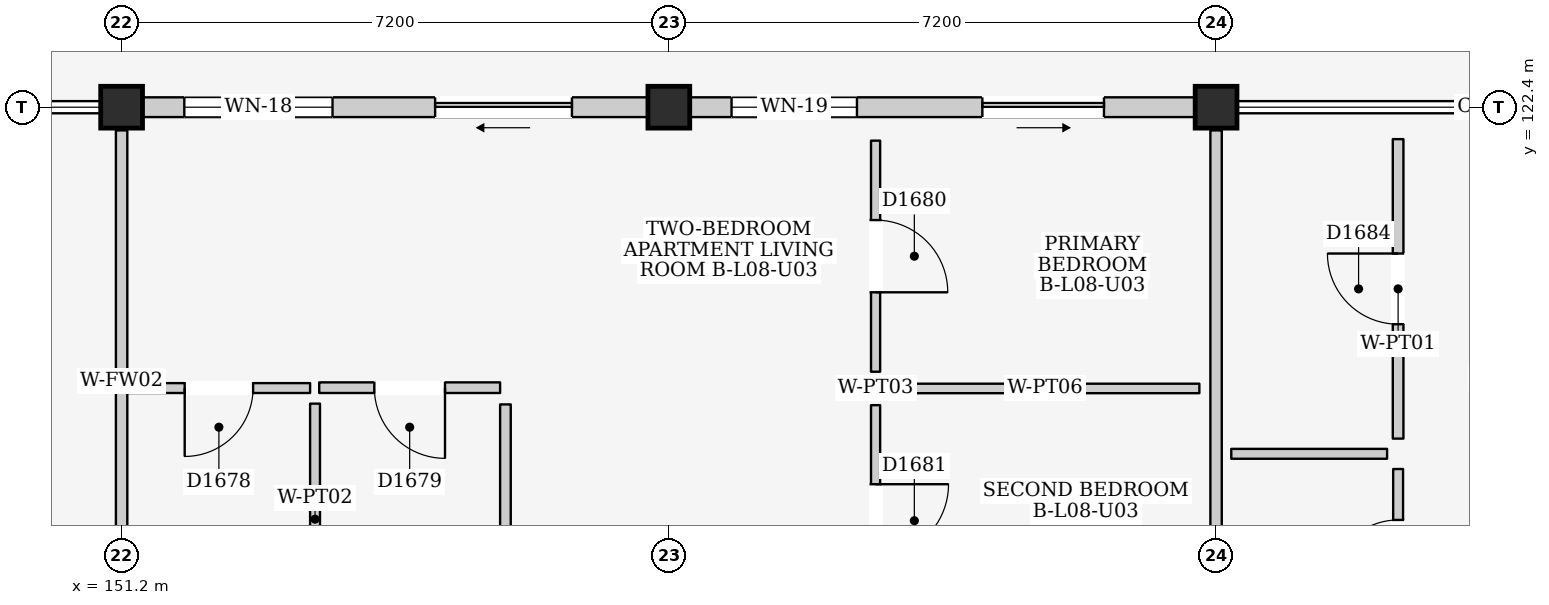
"""IFC4 building model, lengths in metres.
Left out: names, types, materials, properties, quantities, classifications, styles, units other than length and angle.
Written with IfcOpenShell. Run it as: python <this file> out.ifc"""

import sys

from ifc_helpers import new_model, si_unit, direction, frame, frame_2d, origin, origin_2d, place, context, subcontext, project, spatial, rectangle, extrude, element, fill, save


model = new_model("IFC4")
c1 = context("Model", 3, precision=1e-05, world=origin(), true_north=direction((0.0, 1.0)))
c2 = subcontext(c1, "Body", "Model", "MODEL_VIEW")
j1 = project(units=[si_unit("LENGTHUNIT", "METRE"), si_unit("PLANEANGLEUNIT", "RADIAN")], contexts=[c1])
p1 = place(None, origin())
s1 = spatial("IfcSite", under=j1, at=p1, CompositionType="ELEMENT")
p2 = place(p1, origin())
s2 = spatial("IfcBuilding", under=s1, at=p2, CompositionType="ELEMENT")
p3 = place(p2, frame((0.0, 0.0, 28.3)))
s3 = spatial("IfcBuildingStorey", under=s2, at=p3, CompositionType="ELEMENT", Elevation=28.3)
for number, where, z_axis, x_axis in (
    (1, (151.2, 122.4, 0.0), (0.0, 0.0, 1.0), (1.0, 0.0, 0.0)),
    (2, (158.4, 122.4, 0.0), (0.0, 0.0, 1.0), (1.0, 0.0, 0.0)),
    (3, (165.6, 122.4, 0.0), (0.0, 0.0, 1.0), (1.0, 0.0, 0.0)),
):
    element("IfcColumn", number, at=place(p3, frame(where, z_axis=z_axis, x_axis=x_axis)), inside=s3, PredefinedType="COLUMN", context=c2, shape_type="SweptSolid", body=[
        extrude(rectangle(XDim=0.55, YDim=0.55, at=origin_2d()), origin(), (0.0, 0.0, 1.0), 3.2),
    ])
p4 = place(p3, frame((151.475, 122.4, 0.0), z_axis=(0.0, 0.0, 1.0), x_axis=(1.0, 0.0, 0.0)))
e4 = element("IfcWall", 4, at=p4, inside=s3, PredefinedType="ELEMENTEDWALL", context=c2, shape_type="SweptSolid", body=[
    extrude(rectangle(XDim=6.65, YDim=0.26, at=frame_2d((3.325, 0.0))), origin(), (0.0, 0.0, 1.0), 2.485),
])
p5 = place(p4, frame((3.85, 0.0, 0.0)))
e5 = element("IfcOpeningElement", 5, at=p5, cuts=e4, PredefinedType="OPENING", context=c2, shape_type="SweptSolid", body=[
    extrude(rectangle(XDim=1.8, YDim=2.12, at=frame_2d((0.9, 1.06))), frame((0.0, 0.145, 0.0), z_axis=(0.0, -1.0, 0.0), x_axis=(1.0, 0.0, 0.0)), (0.0, 0.0, 1.0), 0.29),
])
p6 = place(p4, frame((0.55, 0.0, 0.825)))
e6 = element("IfcOpeningElement", 6, at=p6, cuts=e4, PredefinedType="OPENING", context=c2, shape_type="SweptSolid", body=[
    extrude(rectangle(XDim=1.95, YDim=1.55, at=frame_2d((0.975, 0.775))), frame((0.0, 0.145, 0.0), z_axis=(0.0, -1.0, 0.0), x_axis=(1.0, 0.0, 0.0)), (0.0, 0.0, 1.0), 0.29),
])
p7 = place(p3, frame((158.675, 122.4, 0.0), z_axis=(0.0, 0.0, 1.0), x_axis=(1.0, 0.0, 0.0)))
e7 = element("IfcWall", 7, at=p7, inside=s3, PredefinedType="ELEMENTEDWALL", context=c2, shape_type="SweptSolid", body=[
    extrude(rectangle(XDim=6.65, YDim=0.26, at=frame_2d((3.325, 0.0))), origin(), (0.0, 0.0, 1.0), 2.485),
])
p8 = place(p7, frame((3.85, 0.0, 0.0)))
e8 = element("IfcOpeningElement", 8, at=p8, cuts=e7, PredefinedType="OPENING", context=c2, shape_type="SweptSolid", body=[
    extrude(rectangle(XDim=1.6, YDim=2.12, at=frame_2d((0.8, 1.06))), frame((0.0, 0.145, 0.0), z_axis=(0.0, -1.0, 0.0), x_axis=(1.0, 0.0, 0.0)), (0.0, 0.0, 1.0), 0.29),
])
p9 = place(p7, frame((0.55, 0.0, 0.9)))
e9 = element("IfcOpeningElement", 9, at=p9, cuts=e7, PredefinedType="OPENING", context=c2, shape_type="SweptSolid", body=[
    extrude(rectangle(XDim=1.65, YDim=1.35, at=frame_2d((0.825, 0.675))), frame((0.0, 0.145, 0.0), z_axis=(0.0, -1.0, 0.0), x_axis=(1.0, 0.0, 0.0)), (0.0, 0.0, 1.0), 0.29),
])
for number, where, z_axis, x_axis in (
    (10, (151.2, 115.505, 0.0), (0.0, 0.0, 1.0), (0.0, 1.0, 0.0)),
    (11, (165.6, 115.505, 0.0), (0.0, 0.0, 1.0), (0.0, 1.0, 0.0)),
):
    element("IfcWall", number, at=place(p3, frame(where, z_axis=z_axis, x_axis=x_axis)), inside=s3, PredefinedType="PARTITIONING", context=c2, shape_type="SweptSolid", body=[
        extrude(rectangle(XDim=6.59, YDim=0.15, at=frame_2d((3.295, 0.0))), origin(), (0.0, 0.0, 1.0), 2.435),
    ])
p10 = place(p3, frame((151.28, 118.705, 0.0), z_axis=(0.0, 0.0, 1.0), x_axis=(1.0, 0.0, 0.0)))
e12 = element("IfcWall", 12, at=p10, inside=s3, PredefinedType="PARTITIONING", context=c2, shape_type="SweptSolid", body=[
    extrude(rectangle(XDim=2.4, YDim=0.13, at=frame_2d((1.2, 0.0))), origin(), (0.0, 0.0, 1.0), 2.95),
])
p11 = place(p10, frame((0.75, 0.0, 0.0)))
e13 = element("IfcOpeningElement", 13, at=p11, cuts=e12, PredefinedType="OPENING", context=c2, shape_type="SweptSolid", body=[
    extrude(rectangle(XDim=0.9, YDim=2.1, at=frame_2d((0.45, 1.05))), frame((0.0, 0.08, 0.0), z_axis=(0.0, -1.0, 0.0), x_axis=(1.0, 0.0, 0.0)), (0.0, 0.0, 1.0), 0.16),
])
p12 = place(p3, frame((153.745, 115.46, 0.0), z_axis=(0.0, 0.0, 1.0), x_axis=(0.0, 1.0, 0.0)))
e14 = element("IfcWall", 14, at=p12, inside=s3, PredefinedType="PARTITIONING", context=c2, shape_type="SweptSolid", body=[
    extrude(rectangle(XDim=3.04, YDim=0.13, at=frame_2d((1.52, 0.0))), origin(), (0.0, 0.0, 1.0), 2.95),
])
p13 = place(p3, frame((153.8, 118.71, 0.0), z_axis=(0.0, 0.0, 1.0), x_axis=(1.0, 0.0, 0.0)))
e15 = element("IfcWall", 15, at=p13, inside=s3, PredefinedType="PARTITIONING", context=c2, shape_type="SweptSolid", body=[
    extrude(rectangle(XDim=2.38, YDim=0.14, at=frame_2d((1.19, 0.0))), origin(), (0.0, 0.0, 1.0), 2.95),
])
p14 = place(p13, frame((0.725, 0.0, 0.0)))
e16 = element("IfcOpeningElement", 16, at=p14, cuts=e15, PredefinedType="OPENING", context=c2, shape_type="SweptSolid", body=[
    extrude(rectangle(XDim=0.93, YDim=2.14, at=frame_2d((0.465, 1.07))), frame((0.0, 0.085, 0.0), z_axis=(0.0, -1.0, 0.0), x_axis=(1.0, 0.0, 0.0)), (0.0, 0.0, 1.0), 0.17),
])
p15 = place(p3, frame((156.25, 115.43, 0.0), z_axis=(0.0, 0.0, 1.0), x_axis=(0.0, 1.0, 0.0)))
e17 = element("IfcWall", 17, at=p15, inside=s3, PredefinedType="PARTITIONING", context=c2, shape_type="SweptSolid", body=[
    extrude(rectangle(XDim=3.06, YDim=0.14, at=frame_2d((1.53, 0.0))), origin(), (0.0, 0.0, 1.0), 2.95),
])
p16 = place(p3, frame((161.12, 118.92, 0.0), z_axis=(0.0, 0.0, 1.0), x_axis=(0.0, 1.0, 0.0)))
e18 = element("IfcWall", 18, at=p16, inside=s3, PredefinedType="PARTITIONING", context=c2, shape_type="SweptSolid", body=[
    extrude(rectangle(XDim=3.04, YDim=0.12, at=frame_2d((1.52, 0.0))), origin(), (0.0, 0.0, 1.0), 2.95),
])
p17 = place(p16, frame((1.045, 0.0, 0.0)))
e19 = element("IfcOpeningElement", 19, at=p17, cuts=e18, PredefinedType="OPENING", context=c2, shape_type="SweptSolid", body=[
    extrude(rectangle(XDim=0.95, YDim=2.15, at=frame_2d((0.475, 1.075))), frame((0.0, 0.075, 0.0), z_axis=(0.0, -1.0, 0.0), x_axis=(1.0, 0.0, 0.0)), (0.0, 0.0, 1.0), 0.15),
])
p18 = place(p3, frame((161.32, 118.7, 0.0), z_axis=(0.0, 0.0, 1.0), x_axis=(1.0, 0.0, 0.0)))
e20 = element("IfcWall", 20, at=p18, inside=s3, PredefinedType="PARTITIONING", context=c2, shape_type="SweptSolid", body=[
    extrude(rectangle(XDim=4.06, YDim=0.125, at=frame_2d((2.03, 0.0))), origin(), (0.0, 0.0, 1.0), 2.95),
])
p19 = place(p3, frame((161.12, 115.44, 0.0), z_axis=(0.0, 0.0, 1.0), x_axis=(0.0, 1.0, 0.0)))
e21 = element("IfcWall", 21, at=p19, inside=s3, PredefinedType="PARTITIONING", context=c2, shape_type="SweptSolid", body=[
    extrude(rectangle(XDim=3.04, YDim=0.12, at=frame_2d((1.52, 0.0))), origin(), (0.0, 0.0, 1.0), 2.95),
])
p20 = place(p19, frame((1.04, 0.0, 0.0)))
e22 = element("IfcOpeningElement", 22, at=p20, cuts=e21, PredefinedType="OPENING", context=c2, shape_type="SweptSolid", body=[
    extrude(rectangle(XDim=0.96, YDim=2.15, at=frame_2d((0.48, 1.075))), frame((0.0, 0.075, 0.0), z_axis=(0.0, -1.0, 0.0), x_axis=(1.0, 0.0, 0.0)), (0.0, 0.0, 1.0), 0.15),
])
p21 = place(p3, frame((165.8, 117.84, 0.0), z_axis=(0.0, 0.0, 1.0), x_axis=(1.0, 0.0, 0.0)))
e23 = element("IfcWall", 23, at=p21, inside=s3, PredefinedType="PARTITIONING", context=c2, shape_type="SweptSolid", body=[
    extrude(rectangle(XDim=2.05, YDim=0.13, at=frame_2d((1.025, 0.0))), origin(), (0.0, 0.0, 1.0), 2.95),
])
p22 = place(p3, frame((167.995, 115.42, 0.0), z_axis=(0.0, 0.0, 1.0), x_axis=(0.0, 1.0, 0.0)))
e24 = element("IfcWall", 24, at=p22, inside=s3, PredefinedType="PARTITIONING", context=c2, shape_type="SweptSolid", body=[
    extrude(rectangle(XDim=2.22, YDim=0.13, at=frame_2d((1.11, 0.0))), origin(), (0.0, 0.0, 1.0), 2.95),
])
p23 = place(p22, frame((0.67, 0.0, 0.0)))
e25 = element("IfcOpeningElement", 25, at=p23, cuts=e24, PredefinedType="OPENING", context=c2, shape_type="SweptSolid", body=[
    extrude(rectangle(XDim=0.88, YDim=2.1, at=frame_2d((0.44, 1.05))), frame((0.0, 0.08, 0.0), z_axis=(0.0, -1.0, 0.0), x_axis=(1.0, 0.0, 0.0)), (0.0, 0.0, 1.0), 0.16),
])
p24 = place(p3, frame((167.995, 118.04, 0.0), z_axis=(0.0, 0.0, 1.0), x_axis=(0.0, 1.0, 0.0)))
e26 = element("IfcWall", 26, at=p24, inside=s3, PredefinedType="PARTITIONING", context=c2, shape_type="SweptSolid", body=[
    extrude(rectangle(XDim=3.94, YDim=0.14, at=frame_2d((1.97, 0.0))), origin(), (0.0, 0.0, 1.0), 2.95),
])
p25 = place(p24, frame((1.505, 0.0, 0.0)))
e27 = element("IfcOpeningElement", 27, at=p25, cuts=e26, PredefinedType="OPENING", context=c2, shape_type="SweptSolid", body=[
    extrude(rectangle(XDim=0.93, YDim=2.14, at=frame_2d((0.465, 1.07))), frame((0.0, 0.085, 0.0), z_axis=(0.0, -1.0, 0.0), x_axis=(1.0, 0.0, 0.0)), (0.0, 0.0, 1.0), 0.17),
])
p26 = place(p5, frame((1.8, 0.0, 0.0), z_axis=(0.0, 0.0, 1.0), x_axis=(-1.0, 0.0, 0.0)))
e28 = element("IfcDoor", 28, at=p26, inside=s3, OperationType="SLIDING_TO_LEFT", PredefinedType="DOOR", context=c2, shape_type="SweptSolid", body=[
    extrude(rectangle(XDim=1.8, YDim=2.12, at=frame_2d((0.9, 1.06))), frame((0.0, 0.025, 0.0), z_axis=(0.0, -1.0, 0.0), x_axis=(1.0, 0.0, 0.0)), (0.0, 0.0, 1.0), 0.05),
])
fill(e5, e28)
p27 = place(p6, origin())
e29 = element("IfcWindow", 29, at=p27, inside=s3, PartitioningType="DOUBLE_PANEL_VERTICAL", PredefinedType="WINDOW", context=c2, shape_type="SweptSolid", body=[
    extrude(rectangle(XDim=1.95, YDim=1.55, at=frame_2d((0.975, 0.775))), frame((0.0, 0.03, 0.0), z_axis=(0.0, -1.0, 0.0), x_axis=(1.0, 0.0, 0.0)), (0.0, 0.0, 1.0), 0.06),
])
fill(e6, e29)
p28 = place(p8, frame((1.6, 0.0, 0.0), z_axis=(0.0, 0.0, 1.0), x_axis=(-1.0, 0.0, 0.0)))
e30 = element("IfcDoor", 30, at=p28, inside=s3, OperationType="SLIDING_TO_RIGHT", PredefinedType="DOOR", context=c2, shape_type="SweptSolid", body=[
    extrude(rectangle(XDim=1.6, YDim=2.12, at=frame_2d((0.8, 1.06))), frame((0.0, 0.025, 0.0), z_axis=(0.0, -1.0, 0.0), x_axis=(1.0, 0.0, 0.0)), (0.0, 0.0, 1.0), 0.05),
])
fill(e8, e30)
p29 = place(p9, origin())
e31 = element("IfcWindow", 31, at=p29, inside=s3, PartitioningType="DOUBLE_PANEL_VERTICAL", PredefinedType="WINDOW", context=c2, shape_type="SweptSolid", body=[
    extrude(rectangle(XDim=1.65, YDim=1.35, at=frame_2d((0.825, 0.675))), frame((0.0, 0.03, 0.0), z_axis=(0.0, -1.0, 0.0), x_axis=(1.0, 0.0, 0.0)), (0.0, 0.0, 1.0), 0.06),
])
fill(e9, e31)
p30 = place(p11, frame((0.9, 0.0, 0.0), z_axis=(0.0, 0.0, 1.0), x_axis=(-1.0, 0.0, 0.0)))
e32 = element("IfcDoor", 32, at=p30, inside=s3, OperationType="SINGLE_SWING_RIGHT", PredefinedType="DOOR", context=c2, shape_type="SweptSolid", body=[
    extrude(rectangle(XDim=0.9, YDim=2.1, at=frame_2d((0.45, 1.05))), frame((0.0, 0.025, 0.0), z_axis=(0.0, -1.0, 0.0), x_axis=(1.0, 0.0, 0.0)), (0.0, 0.0, 1.0), 0.05),
])
fill(e13, e32)
p31 = place(p14, frame((0.93, 0.0, 0.0), z_axis=(0.0, 0.0, 1.0), x_axis=(-1.0, 0.0, 0.0)))
e33 = element("IfcDoor", 33, at=p31, inside=s3, OperationType="SINGLE_SWING_LEFT", PredefinedType="DOOR", context=c2, shape_type="SweptSolid", body=[
    extrude(rectangle(XDim=0.93, YDim=2.14, at=frame_2d((0.465, 1.07))), frame((0.0, 0.025, 0.0), z_axis=(0.0, -1.0, 0.0), x_axis=(1.0, 0.0, 0.0)), (0.0, 0.0, 1.0), 0.05),
])
fill(e16, e33)
p32 = place(p17, frame((0.95, 0.0, 0.0), z_axis=(0.0, 0.0, 1.0), x_axis=(-1.0, 0.0, 0.0)))
e34 = element("IfcDoor", 34, at=p32, inside=s3, OperationType="SINGLE_SWING_RIGHT", PredefinedType="DOOR", context=c2, shape_type="SweptSolid", body=[
    extrude(rectangle(XDim=0.95, YDim=2.15, at=frame_2d((0.475, 1.075))), frame((0.0, 0.025, 0.0), z_axis=(0.0, -1.0, 0.0), x_axis=(1.0, 0.0, 0.0)), (0.0, 0.0, 1.0), 0.05),
])
fill(e19, e34)
p33 = place(p20, frame((0.96, 0.0, 0.0), z_axis=(0.0, 0.0, 1.0), x_axis=(-1.0, 0.0, 0.0)))
e35 = element("IfcDoor", 35, at=p33, inside=s3, OperationType="SINGLE_SWING_LEFT", PredefinedType="DOOR", context=c2, shape_type="SweptSolid", body=[
    extrude(rectangle(XDim=0.96, YDim=2.15, at=frame_2d((0.48, 1.075))), frame((0.0, 0.025, 0.0), z_axis=(0.0, -1.0, 0.0), x_axis=(1.0, 0.0, 0.0)), (0.0, 0.0, 1.0), 0.05),
])
fill(e22, e35)
p34 = place(p23, origin())
e36 = element("IfcDoor", 36, at=p34, inside=s3, OperationType="SINGLE_SWING_LEFT", PredefinedType="DOOR", context=c2, shape_type="SweptSolid", body=[
    extrude(rectangle(XDim=0.88, YDim=2.1, at=frame_2d((0.44, 1.05))), frame((0.0, 0.025, 0.0), z_axis=(0.0, -1.0, 0.0), x_axis=(1.0, 0.0, 0.0)), (0.0, 0.0, 1.0), 0.05),
])
fill(e25, e36)
p35 = place(p25, origin())
e37 = element("IfcDoor", 37, at=p35, inside=s3, OperationType="SINGLE_SWING_RIGHT", PredefinedType="DOOR", context=c2, shape_type="SweptSolid", body=[
    extrude(rectangle(XDim=0.93, YDim=2.14, at=frame_2d((0.465, 1.07))), frame((0.0, 0.025, 0.0), z_axis=(0.0, -1.0, 0.0), x_axis=(1.0, 0.0, 0.0)), (0.0, 0.0, 1.0), 0.05),
])
fill(e27, e37)
save(model, sys.argv[1])
